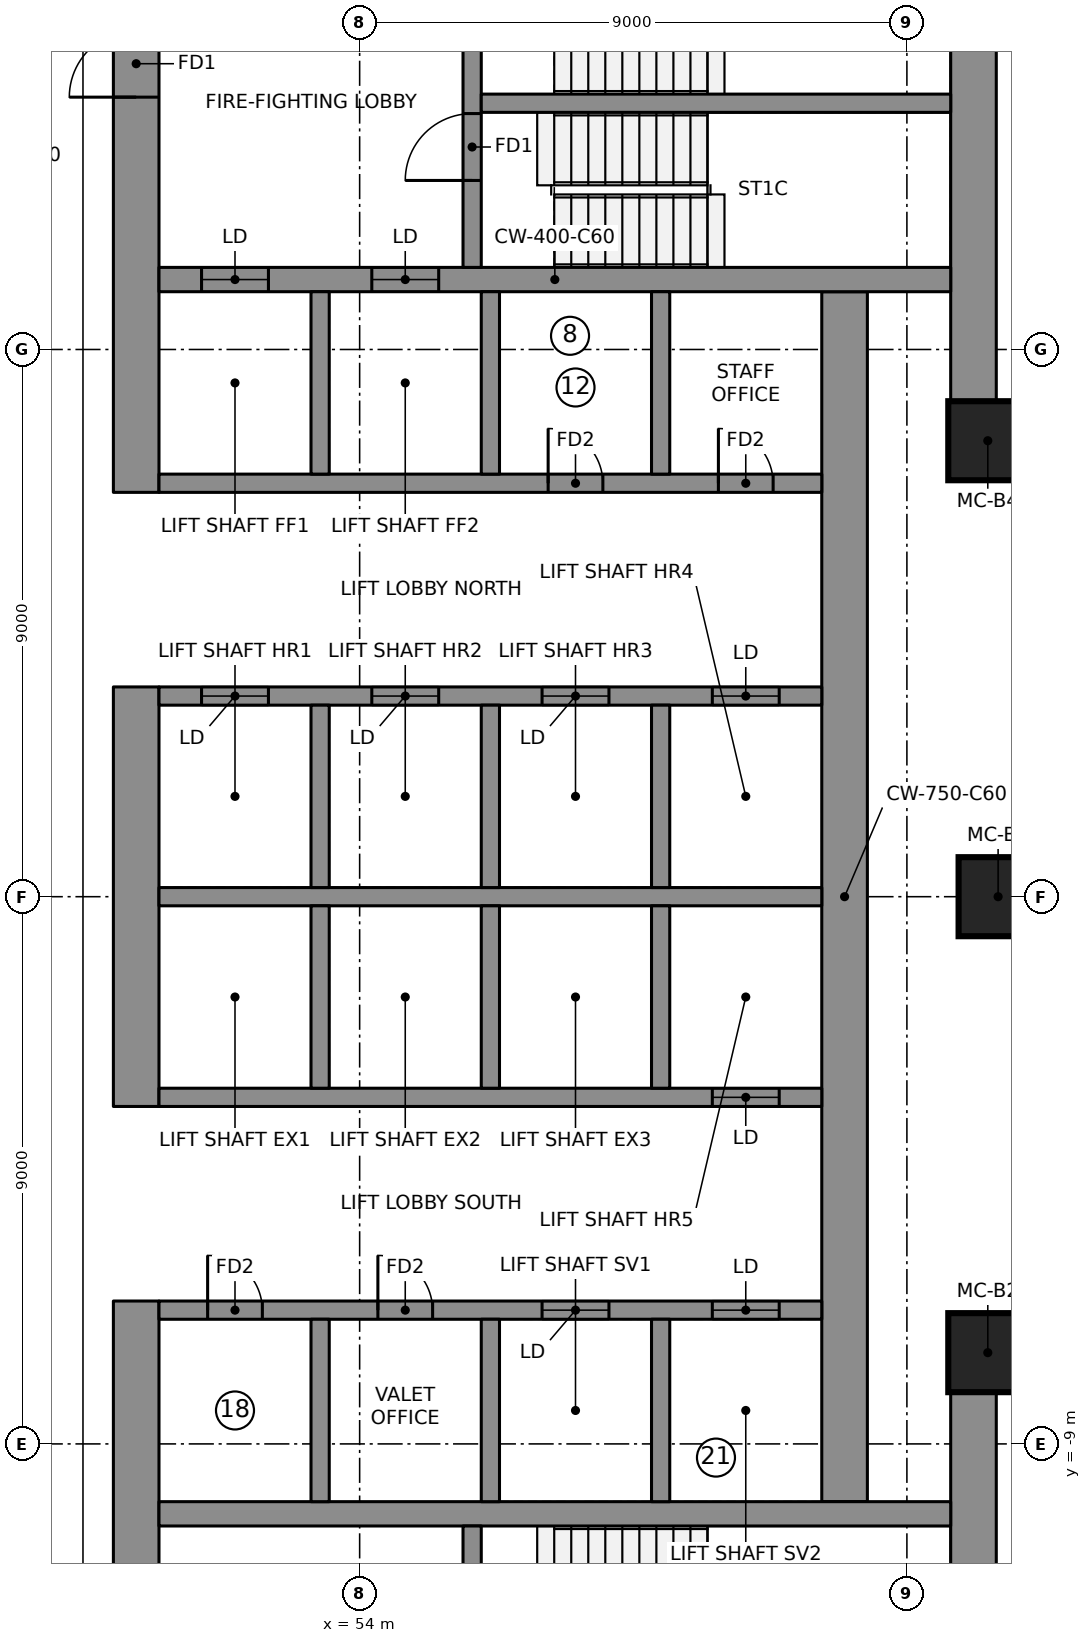
"""IFC4 building model, lengths in metres.
Left out: names, types, materials, properties, quantities, classifications, styles, units other than length and angle.
Written with IfcOpenShell. Run it as: python <this file> out.ifc"""

import sys

from ifc_helpers import new_model, si_unit, direction, frame, frame_2d, origin, origin_2d, place, context, subcontext, project, spatial, rectangle, extrude, element, fill, save


model = new_model("IFC4")
c1 = context("Model", 3, precision=1e-05, world=origin(), true_north=direction((0.0, 1.0)))
c2 = subcontext(c1, "Body", "Model", "MODEL_VIEW")
j1 = project(units=[si_unit("LENGTHUNIT", "METRE"), si_unit("PLANEANGLEUNIT", "RADIAN")], contexts=[c1])
p1 = place(None, origin())
s1 = spatial("IfcSite", under=j1, at=p1, CompositionType="ELEMENT")
p2 = place(p1, origin())
s2 = spatial("IfcBuilding", under=s1, at=p2, CompositionType="ELEMENT")
p3 = place(p2, frame((0.0, 0.0, 203.9)))
s3 = spatial("IfcBuildingStorey", under=s2, at=p3, CompositionType="ELEMENT", Elevation=203.9)
p4 = place(p3, frame((50.325, 6.65, 0.0), z_axis=(0.0, 0.0, 1.0), x_axis=(0.0, 1.0, 0.0)))
e1 = element("IfcWall", 1, at=p4, inside=s3, PredefinedType="SHEAR", context=c2, shape_type="SweptSolid", body=[
    extrude(rectangle(XDim=9.85, YDim=0.75, at=frame_2d((4.925, 0.0))), origin(), (0.0, 0.0, 1.0), 3.55),
])
p5 = place(p4, frame((6.5, 0.0, 0.0)))
e2 = element("IfcOpeningElement", 2, at=p5, cuts=e1, PredefinedType="OPENING", context=c2, shape_type="SweptSolid", body=[
    extrude(rectangle(XDim=1.1, YDim=2.1, at=frame_2d((0.55, 1.05))), frame((0.0, 0.385, 0.0), z_axis=(0.0, -1.0, 0.0), x_axis=(1.0, 0.0, 0.0)), (0.0, 0.0, 1.0), 0.77),
])
p6 = place(p3, frame((50.325, -3.45, 0.0), z_axis=(0.0, 0.0, 1.0), x_axis=(0.0, 1.0, 0.0)))
e3 = element("IfcWall", 3, at=p6, inside=s3, PredefinedType="SHEAR", context=c2, shape_type="SweptSolid", body=[
    extrude(rectangle(XDim=6.9, YDim=0.75, at=frame_2d((3.45, 0.0))), origin(), (0.0, 0.0, 1.0), 3.55),
])
p7 = place(p3, frame((50.325, -16.5, 0.0), z_axis=(0.0, 0.0, 1.0), x_axis=(0.0, 1.0, 0.0)))
e4 = element("IfcWall", 4, at=p7, inside=s3, PredefinedType="SHEAR", context=c2, shape_type="SweptSolid", body=[
    extrude(rectangle(XDim=9.85, YDim=0.75, at=frame_2d((4.925, 0.0))), origin(), (0.0, 0.0, 1.0), 3.55),
])
p8 = place(p7, frame((2.25, 0.0, 0.0)))
e5 = element("IfcOpeningElement", 5, at=p8, cuts=e4, PredefinedType="OPENING", context=c2, shape_type="SweptSolid", body=[
    extrude(rectangle(XDim=1.1, YDim=2.1, at=frame_2d((0.55, 1.05))), frame((0.0, 0.385, 0.0), z_axis=(0.0, -1.0, 0.0), x_axis=(1.0, 0.0, 0.0)), (0.0, 0.0, 1.0), 0.77),
])
for number, where, z_axis, x_axis in (
    (6, (64.095, 8.099, 0.0), (0.0, 0.0, 1.0), (0.0, 1.0, 0.0)),
    (7, (64.095, -15.75, 0.0), (0.0, 0.0, 1.0), (0.0, 1.0, 0.0)),
):
    element("IfcWall", number, at=place(p3, frame(where, z_axis=z_axis, x_axis=x_axis)), inside=s3, PredefinedType="SHEAR", context=c2, shape_type="SweptSolid", body=[
        extrude(rectangle(XDim=7.651, YDim=0.75, at=frame_2d((3.825, 0.0))), origin(), (0.0, 0.0, 1.0), 3.55),
    ])
p9 = place(p3, frame((61.975, -9.95, 0.0), z_axis=(0.0, 0.0, 1.0), x_axis=(0.0, 1.0, 0.0)))
e8 = element("IfcWall", 8, at=p9, inside=s3, PredefinedType="SHEAR", context=c2, shape_type="SweptSolid", body=[
    extrude(rectangle(XDim=19.9, YDim=0.75, at=frame_2d((9.95, 0.0))), origin(), (0.0, 0.0, 1.0), 3.55),
])
p10 = place(p3, frame((50.7, 10.15, 0.0), z_axis=(0.0, 0.0, 1.0), x_axis=(1.0, 0.0, 0.0)))
e9 = element("IfcWall", 9, at=p10, inside=s3, PredefinedType="SHEAR", context=c2, shape_type="SweptSolid", body=[
    extrude(rectangle(XDim=13.02, YDim=0.4, at=frame_2d((6.51, 0.0))), origin(), (0.0, 0.0, 1.0), 3.55),
])
p11 = place(p10, frame((0.7, 0.0, 0.0)))
e10 = element("IfcOpeningElement", 10, at=p11, cuts=e9, PredefinedType="OPENING", context=c2, shape_type="SweptSolid", body=[
    extrude(rectangle(XDim=1.1, YDim=2.1, at=frame_2d((0.55, 1.05))), frame((0.0, 0.21, 0.0), z_axis=(0.0, -1.0, 0.0), x_axis=(1.0, 0.0, 0.0)), (0.0, 0.0, 1.0), 0.42),
])
p12 = place(p10, frame((3.5, 0.0, 0.0)))
e11 = element("IfcOpeningElement", 11, at=p12, cuts=e9, PredefinedType="OPENING", context=c2, shape_type="SweptSolid", body=[
    extrude(rectangle(XDim=1.1, YDim=2.1, at=frame_2d((0.55, 1.05))), frame((0.0, 0.21, 0.0), z_axis=(0.0, -1.0, 0.0), x_axis=(1.0, 0.0, 0.0)), (0.0, 0.0, 1.0), 0.42),
])
p13 = place(p3, frame((50.7, -10.15, 0.0), z_axis=(0.0, 0.0, 1.0), x_axis=(1.0, 0.0, 0.0)))
e12 = element("IfcWall", 12, at=p13, inside=s3, PredefinedType="SHEAR", context=c2, shape_type="SweptSolid", body=[
    extrude(rectangle(XDim=13.02, YDim=0.4, at=frame_2d((6.51, 0.0))), origin(), (0.0, 0.0, 1.0), 3.55),
])
p14 = place(p3, frame((50.7, 0.0, 0.0), z_axis=(0.0, 0.0, 1.0), x_axis=(1.0, 0.0, 0.0)))
e13 = element("IfcWall", 13, at=p14, inside=s3, PredefinedType="SHEAR", context=c2, shape_type="SweptSolid", body=[
    extrude(rectangle(XDim=10.9, YDim=0.3, at=frame_2d((5.45, 0.0))), origin(), (0.0, 0.0, 1.0), 3.55),
])
p15 = place(p3, frame((50.7, 3.3, 0.0), z_axis=(0.0, 0.0, 1.0), x_axis=(1.0, 0.0, 0.0)))
e14 = element("IfcWall", 14, at=p15, inside=s3, PredefinedType="SHEAR", context=c2, shape_type="SweptSolid", body=[
    extrude(rectangle(XDim=10.9, YDim=0.3, at=frame_2d((5.45, 0.0))), origin(), (0.0, 0.0, 1.0), 3.55),
])
p16 = place(p15, frame((0.7, 0.0, 0.0)))
e15 = element("IfcOpeningElement", 15, at=p16, cuts=e14, PredefinedType="OPENING", context=c2, shape_type="SweptSolid", body=[
    extrude(rectangle(XDim=1.1, YDim=2.1, at=frame_2d((0.55, 1.05))), frame((0.0, 0.16, 0.0), z_axis=(0.0, -1.0, 0.0), x_axis=(1.0, 0.0, 0.0)), (0.0, 0.0, 1.0), 0.32),
])
p17 = place(p15, frame((3.5, 0.0, 0.0)))
e16 = element("IfcOpeningElement", 16, at=p17, cuts=e14, PredefinedType="OPENING", context=c2, shape_type="SweptSolid", body=[
    extrude(rectangle(XDim=1.1, YDim=2.1, at=frame_2d((0.55, 1.05))), frame((0.0, 0.16, 0.0), z_axis=(0.0, -1.0, 0.0), x_axis=(1.0, 0.0, 0.0)), (0.0, 0.0, 1.0), 0.32),
])
p18 = place(p15, frame((6.3, 0.0, 0.0)))
e17 = element("IfcOpeningElement", 17, at=p18, cuts=e14, PredefinedType="OPENING", context=c2, shape_type="SweptSolid", body=[
    extrude(rectangle(XDim=1.1, YDim=2.1, at=frame_2d((0.55, 1.05))), frame((0.0, 0.16, 0.0), z_axis=(0.0, -1.0, 0.0), x_axis=(1.0, 0.0, 0.0)), (0.0, 0.0, 1.0), 0.32),
])
p19 = place(p15, frame((9.1, 0.0, 0.0)))
e18 = element("IfcOpeningElement", 18, at=p19, cuts=e14, PredefinedType="OPENING", context=c2, shape_type="SweptSolid", body=[
    extrude(rectangle(XDim=1.1, YDim=2.1, at=frame_2d((0.55, 1.05))), frame((0.0, 0.16, 0.0), z_axis=(0.0, -1.0, 0.0), x_axis=(1.0, 0.0, 0.0)), (0.0, 0.0, 1.0), 0.32),
])
p20 = place(p3, frame((50.7, 6.8, 0.0), z_axis=(0.0, 0.0, 1.0), x_axis=(1.0, 0.0, 0.0)))
e19 = element("IfcWall", 19, at=p20, inside=s3, PredefinedType="SHEAR", context=c2, shape_type="SweptSolid", body=[
    extrude(rectangle(XDim=10.9, YDim=0.3, at=frame_2d((5.45, 0.0))), origin(), (0.0, 0.0, 1.0), 3.55),
])
p21 = place(p20, frame((6.4, 0.0, 0.0)))
e20 = element("IfcOpeningElement", 20, at=p21, cuts=e19, PredefinedType="OPENING", context=c2, shape_type="SweptSolid", body=[
    extrude(rectangle(XDim=0.9, YDim=2.1, at=frame_2d((0.45, 1.05))), frame((0.0, 0.16, 0.0), z_axis=(0.0, -1.0, 0.0), x_axis=(1.0, 0.0, 0.0)), (0.0, 0.0, 1.0), 0.32),
])
p22 = place(p20, frame((9.2, 0.0, 0.0)))
e21 = element("IfcOpeningElement", 21, at=p22, cuts=e19, PredefinedType="OPENING", context=c2, shape_type="SweptSolid", body=[
    extrude(rectangle(XDim=0.9, YDim=2.1, at=frame_2d((0.45, 1.05))), frame((0.0, 0.16, 0.0), z_axis=(0.0, -1.0, 0.0), x_axis=(1.0, 0.0, 0.0)), (0.0, 0.0, 1.0), 0.32),
])
for number, where, z_axis, x_axis in (
    (22, (53.35, 0.15, 0.0), (0.0, 0.0, 1.0), (0.0, 1.0, 0.0)),
    (23, (53.35, 6.95, 0.0), (0.0, 0.0, 1.0), (0.0, 1.0, 0.0)),
    (24, (56.15, 0.15, 0.0), (0.0, 0.0, 1.0), (0.0, 1.0, 0.0)),
    (25, (56.15, 6.95, 0.0), (0.0, 0.0, 1.0), (0.0, 1.0, 0.0)),
    (26, (58.95, 0.15, 0.0), (0.0, 0.0, 1.0), (0.0, 1.0, 0.0)),
    (27, (58.95, 6.95, 0.0), (0.0, 0.0, 1.0), (0.0, 1.0, 0.0)),
):
    element("IfcWall", number, at=place(p3, frame(where, z_axis=z_axis, x_axis=x_axis)), inside=s3, PredefinedType="SHEAR", context=c2, shape_type="SweptSolid", body=[
        extrude(rectangle(XDim=3.0, YDim=0.3, at=frame_2d((1.5, 0.0))), origin(), (0.0, 0.0, 1.0), 3.55),
    ])
p23 = place(p3, frame((50.7, -3.3, 0.0), z_axis=(0.0, 0.0, 1.0), x_axis=(1.0, 0.0, 0.0)))
e28 = element("IfcWall", 28, at=p23, inside=s3, PredefinedType="SHEAR", context=c2, shape_type="SweptSolid", body=[
    extrude(rectangle(XDim=10.9, YDim=0.3, at=frame_2d((5.45, 0.0))), origin(), (0.0, 0.0, 1.0), 3.55),
])
p24 = place(p23, frame((9.1, 0.0, 0.0)))
e29 = element("IfcOpeningElement", 29, at=p24, cuts=e28, PredefinedType="OPENING", context=c2, shape_type="SweptSolid", body=[
    extrude(rectangle(XDim=1.1, YDim=2.1, at=frame_2d((0.55, 1.05))), frame((0.0, 0.16, 0.0), z_axis=(0.0, -1.0, 0.0), x_axis=(1.0, 0.0, 0.0)), (0.0, 0.0, 1.0), 0.32),
])
p25 = place(p3, frame((50.7, -6.8, 0.0), z_axis=(0.0, 0.0, 1.0), x_axis=(1.0, 0.0, 0.0)))
e30 = element("IfcWall", 30, at=p25, inside=s3, PredefinedType="SHEAR", context=c2, shape_type="SweptSolid", body=[
    extrude(rectangle(XDim=10.9, YDim=0.3, at=frame_2d((5.45, 0.0))), origin(), (0.0, 0.0, 1.0), 3.55),
])
p26 = place(p25, frame((6.3, 0.0, 0.0)))
e31 = element("IfcOpeningElement", 31, at=p26, cuts=e30, PredefinedType="OPENING", context=c2, shape_type="SweptSolid", body=[
    extrude(rectangle(XDim=1.1, YDim=2.1, at=frame_2d((0.55, 1.05))), frame((0.0, 0.16, 0.0), z_axis=(0.0, -1.0, 0.0), x_axis=(1.0, 0.0, 0.0)), (0.0, 0.0, 1.0), 0.32),
])
p27 = place(p25, frame((9.1, 0.0, 0.0)))
e32 = element("IfcOpeningElement", 32, at=p27, cuts=e30, PredefinedType="OPENING", context=c2, shape_type="SweptSolid", body=[
    extrude(rectangle(XDim=1.1, YDim=2.1, at=frame_2d((0.55, 1.05))), frame((0.0, 0.16, 0.0), z_axis=(0.0, -1.0, 0.0), x_axis=(1.0, 0.0, 0.0)), (0.0, 0.0, 1.0), 0.32),
])
p28 = place(p25, frame((0.8, 0.0, 0.0)))
e33 = element("IfcOpeningElement", 33, at=p28, cuts=e30, PredefinedType="OPENING", context=c2, shape_type="SweptSolid", body=[
    extrude(rectangle(XDim=0.9, YDim=2.1, at=frame_2d((0.45, 1.05))), frame((0.0, 0.16, 0.0), z_axis=(0.0, -1.0, 0.0), x_axis=(1.0, 0.0, 0.0)), (0.0, 0.0, 1.0), 0.32),
])
p29 = place(p25, frame((3.6, 0.0, 0.0)))
e34 = element("IfcOpeningElement", 34, at=p29, cuts=e30, PredefinedType="OPENING", context=c2, shape_type="SweptSolid", body=[
    extrude(rectangle(XDim=0.9, YDim=2.1, at=frame_2d((0.45, 1.05))), frame((0.0, 0.16, 0.0), z_axis=(0.0, -1.0, 0.0), x_axis=(1.0, 0.0, 0.0)), (0.0, 0.0, 1.0), 0.32),
])
for number, where, z_axis, x_axis in (
    (35, (53.35, -3.15, 0.0), (0.0, 0.0, 1.0), (0.0, 1.0, 0.0)),
    (36, (53.35, -9.95, 0.0), (0.0, 0.0, 1.0), (0.0, 1.0, 0.0)),
    (37, (56.15, -3.15, 0.0), (0.0, 0.0, 1.0), (0.0, 1.0, 0.0)),
    (38, (56.15, -9.95, 0.0), (0.0, 0.0, 1.0), (0.0, 1.0, 0.0)),
    (39, (58.95, -3.15, 0.0), (0.0, 0.0, 1.0), (0.0, 1.0, 0.0)),
    (40, (58.95, -9.95, 0.0), (0.0, 0.0, 1.0), (0.0, 1.0, 0.0)),
):
    element("IfcWall", number, at=place(p3, frame(where, z_axis=z_axis, x_axis=x_axis)), inside=s3, PredefinedType="SHEAR", context=c2, shape_type="SweptSolid", body=[
        extrude(rectangle(XDim=3.0, YDim=0.3, at=frame_2d((1.5, 0.0))), origin(), (0.0, 0.0, 1.0), 3.55),
    ])
p30 = place(p3, frame((55.85, 10.35, 0.0), z_axis=(0.0, 0.0, 1.0), x_axis=(0.0, 1.0, 0.0)))
e41 = element("IfcWall", 41, at=p30, inside=s3, PredefinedType="SHEAR", context=c2, shape_type="SweptSolid", body=[
    extrude(rectangle(XDim=5.4, YDim=0.3, at=frame_2d((2.7, 0.0))), origin(), (0.0, 0.0, 1.0), 3.55),
])
p31 = place(p30, frame((1.43, 0.0, 0.0)))
e42 = element("IfcOpeningElement", 42, at=p31, cuts=e41, PredefinedType="OPENING", context=c2, shape_type="SweptSolid", body=[
    extrude(rectangle(XDim=1.1, YDim=2.1, at=frame_2d((0.55, 1.05))), frame((0.0, 0.16, 0.0), z_axis=(0.0, -1.0, 0.0), x_axis=(1.0, 0.0, 0.0)), (0.0, 0.0, 1.0), 0.32),
])
p32 = place(p30, frame((3.6, 0.0, 0.0)))
e43 = element("IfcOpeningElement", 43, at=p32, cuts=e41, PredefinedType="OPENING", context=c2, shape_type="SweptSolid", body=[
    extrude(rectangle(XDim=1.1, YDim=2.1, at=frame_2d((0.55, 1.05))), frame((0.0, 0.16, 0.0), z_axis=(0.0, -1.0, 0.0), x_axis=(1.0, 0.0, 0.0)), (0.0, 0.0, 1.0), 0.32),
])
p33 = place(p3, frame((55.85, -15.75, 0.0), z_axis=(0.0, 0.0, 1.0), x_axis=(0.0, 1.0, 0.0)))
e44 = element("IfcWall", 44, at=p33, inside=s3, PredefinedType="SHEAR", context=c2, shape_type="SweptSolid", body=[
    extrude(rectangle(XDim=5.4, YDim=0.3, at=frame_2d((2.7, 0.0))), origin(), (0.0, 0.0, 1.0), 3.55),
])
p34 = place(p33, frame((3.6, 0.0, 0.0)))
e45 = element("IfcOpeningElement", 45, at=p34, cuts=e44, PredefinedType="OPENING", context=c2, shape_type="SweptSolid", body=[
    extrude(rectangle(XDim=1.1, YDim=2.1, at=frame_2d((0.55, 1.05))), frame((0.0, 0.16, 0.0), z_axis=(0.0, -1.0, 0.0), x_axis=(1.0, 0.0, 0.0)), (0.0, 0.0, 1.0), 0.32),
])
p35 = place(p33, frame((0.8, 0.0, 0.0)))
e46 = element("IfcOpeningElement", 46, at=p35, cuts=e44, PredefinedType="OPENING", context=c2, shape_type="SweptSolid", body=[
    extrude(rectangle(XDim=0.9, YDim=2.1, at=frame_2d((0.45, 1.05))), frame((0.0, 0.16, 0.0), z_axis=(0.0, -1.0, 0.0), x_axis=(1.0, 0.0, 0.0)), (0.0, 0.0, 1.0), 0.32),
])
p36 = place(p3, frame((56.0, 13.05, 0.0), z_axis=(0.0, 0.0, 1.0), x_axis=(1.0, 0.0, 0.0)))
e47 = element("IfcWall", 47, at=p36, inside=s3, PredefinedType="SHEAR", context=c2, shape_type="SweptSolid", body=[
    extrude(rectangle(XDim=7.72, YDim=0.3, at=frame_2d((3.86, 0.0))), origin(), (0.0, 0.0, 1.0), 3.55),
])
for number, where, z_axis, x_axis in (
    (48, (64.33, -7.499, 0.0), (0.0, 0.0, 1.0), (1.0, 0.0, 0.0)),
    (49, (64.5, 0.0, 0.0), (0.0, 0.0, 1.0), (1.0, 0.0, 0.0)),
    (50, (64.33, 7.499, 0.0), (0.0, 0.0, 1.0), (1.0, 0.0, 0.0)),
):
    element("IfcColumn", number, at=place(p3, frame(where, z_axis=z_axis, x_axis=x_axis)), inside=s3, PredefinedType="COLUMN", context=c2, shape_type="SweptSolid", body=[
        extrude(rectangle(XDim=1.3, YDim=1.3, at=origin_2d()), origin(), (0.0, 0.0, 1.0), 3.55),
    ])
p37 = place(p11, origin())
e51 = element("IfcDoor", 51, at=p37, inside=s3, OperationType="DOUBLE_DOOR_SLIDING", PredefinedType="DOOR", context=c2, shape_type="SweptSolid", body=[
    extrude(rectangle(XDim=1.1, YDim=2.1, at=frame_2d((0.55, 1.05))), frame((0.0, 0.025, 0.0), z_axis=(0.0, -1.0, 0.0), x_axis=(1.0, 0.0, 0.0)), (0.0, 0.0, 1.0), 0.05),
])
fill(e10, e51)
p38 = place(p12, origin())
e52 = element("IfcDoor", 52, at=p38, inside=s3, OperationType="DOUBLE_DOOR_SLIDING", PredefinedType="DOOR", context=c2, shape_type="SweptSolid", body=[
    extrude(rectangle(XDim=1.1, YDim=2.1, at=frame_2d((0.55, 1.05))), frame((0.0, 0.025, 0.0), z_axis=(0.0, -1.0, 0.0), x_axis=(1.0, 0.0, 0.0)), (0.0, 0.0, 1.0), 0.05),
])
fill(e11, e52)
p39 = place(p16, origin())
e53 = element("IfcDoor", 53, at=p39, inside=s3, OperationType="DOUBLE_DOOR_SLIDING", PredefinedType="DOOR", context=c2, shape_type="SweptSolid", body=[
    extrude(rectangle(XDim=1.1, YDim=2.1, at=frame_2d((0.55, 1.05))), frame((0.0, 0.025, 0.0), z_axis=(0.0, -1.0, 0.0), x_axis=(1.0, 0.0, 0.0)), (0.0, 0.0, 1.0), 0.05),
])
fill(e15, e53)
p40 = place(p17, origin())
e54 = element("IfcDoor", 54, at=p40, inside=s3, OperationType="DOUBLE_DOOR_SLIDING", PredefinedType="DOOR", context=c2, shape_type="SweptSolid", body=[
    extrude(rectangle(XDim=1.1, YDim=2.1, at=frame_2d((0.55, 1.05))), frame((0.0, 0.025, 0.0), z_axis=(0.0, -1.0, 0.0), x_axis=(1.0, 0.0, 0.0)), (0.0, 0.0, 1.0), 0.05),
])
fill(e16, e54)
p41 = place(p18, origin())
e55 = element("IfcDoor", 55, at=p41, inside=s3, OperationType="DOUBLE_DOOR_SLIDING", PredefinedType="DOOR", context=c2, shape_type="SweptSolid", body=[
    extrude(rectangle(XDim=1.1, YDim=2.1, at=frame_2d((0.55, 1.05))), frame((0.0, 0.025, 0.0), z_axis=(0.0, -1.0, 0.0), x_axis=(1.0, 0.0, 0.0)), (0.0, 0.0, 1.0), 0.05),
])
fill(e17, e55)
p42 = place(p19, origin())
e56 = element("IfcDoor", 56, at=p42, inside=s3, OperationType="DOUBLE_DOOR_SLIDING", PredefinedType="DOOR", context=c2, shape_type="SweptSolid", body=[
    extrude(rectangle(XDim=1.1, YDim=2.1, at=frame_2d((0.55, 1.05))), frame((0.0, 0.025, 0.0), z_axis=(0.0, -1.0, 0.0), x_axis=(1.0, 0.0, 0.0)), (0.0, 0.0, 1.0), 0.05),
])
fill(e18, e56)
p43 = place(p24, origin())
e57 = element("IfcDoor", 57, at=p43, inside=s3, OperationType="DOUBLE_DOOR_SLIDING", PredefinedType="DOOR", context=c2, shape_type="SweptSolid", body=[
    extrude(rectangle(XDim=1.1, YDim=2.1, at=frame_2d((0.55, 1.05))), frame((0.0, 0.025, 0.0), z_axis=(0.0, -1.0, 0.0), x_axis=(1.0, 0.0, 0.0)), (0.0, 0.0, 1.0), 0.05),
])
fill(e29, e57)
p44 = place(p26, origin())
e58 = element("IfcDoor", 58, at=p44, inside=s3, OperationType="DOUBLE_DOOR_SLIDING", PredefinedType="DOOR", context=c2, shape_type="SweptSolid", body=[
    extrude(rectangle(XDim=1.1, YDim=2.1, at=frame_2d((0.55, 1.05))), frame((0.0, 0.025, 0.0), z_axis=(0.0, -1.0, 0.0), x_axis=(1.0, 0.0, 0.0)), (0.0, 0.0, 1.0), 0.05),
])
fill(e31, e58)
p45 = place(p27, origin())
e59 = element("IfcDoor", 59, at=p45, inside=s3, OperationType="DOUBLE_DOOR_SLIDING", PredefinedType="DOOR", context=c2, shape_type="SweptSolid", body=[
    extrude(rectangle(XDim=1.1, YDim=2.1, at=frame_2d((0.55, 1.05))), frame((0.0, 0.025, 0.0), z_axis=(0.0, -1.0, 0.0), x_axis=(1.0, 0.0, 0.0)), (0.0, 0.0, 1.0), 0.05),
])
fill(e32, e59)
p46 = place(p31, origin())
e60 = element("IfcDoor", 60, at=p46, inside=s3, OperationType="SINGLE_SWING_RIGHT", PredefinedType="DOOR", context=c2, shape_type="SweptSolid", body=[
    extrude(rectangle(XDim=1.1, YDim=2.1, at=frame_2d((0.55, 1.05))), frame((0.0, 0.025, 0.0), z_axis=(0.0, -1.0, 0.0), x_axis=(1.0, 0.0, 0.0)), (0.0, 0.0, 1.0), 0.05),
])
fill(e42, e60)
p47 = place(p5, origin())
e61 = element("IfcDoor", 61, at=p47, inside=s3, OperationType="SINGLE_SWING_RIGHT", PredefinedType="DOOR", context=c2, shape_type="SweptSolid", body=[
    extrude(rectangle(XDim=1.1, YDim=2.1, at=frame_2d((0.55, 1.05))), frame((0.0, 0.025, 0.0), z_axis=(0.0, -1.0, 0.0), x_axis=(1.0, 0.0, 0.0)), (0.0, 0.0, 1.0), 0.05),
])
fill(e2, e61)
p48 = place(p21, origin())
e62 = element("IfcDoor", 62, at=p48, inside=s3, OperationType="SINGLE_SWING_LEFT", PredefinedType="DOOR", context=c2, shape_type="SweptSolid", body=[
    extrude(rectangle(XDim=0.9, YDim=2.1, at=frame_2d((0.45, 1.05))), frame((0.0, 0.025, 0.0), z_axis=(0.0, -1.0, 0.0), x_axis=(1.0, 0.0, 0.0)), (0.0, 0.0, 1.0), 0.05),
])
fill(e20, e62)
p49 = place(p22, origin())
e63 = element("IfcDoor", 63, at=p49, inside=s3, OperationType="SINGLE_SWING_LEFT", PredefinedType="DOOR", context=c2, shape_type="SweptSolid", body=[
    extrude(rectangle(XDim=0.9, YDim=2.1, at=frame_2d((0.45, 1.05))), frame((0.0, 0.025, 0.0), z_axis=(0.0, -1.0, 0.0), x_axis=(1.0, 0.0, 0.0)), (0.0, 0.0, 1.0), 0.05),
])
fill(e21, e63)
p50 = place(p28, origin())
e64 = element("IfcDoor", 64, at=p50, inside=s3, OperationType="SINGLE_SWING_LEFT", PredefinedType="DOOR", context=c2, shape_type="SweptSolid", body=[
    extrude(rectangle(XDim=0.9, YDim=2.1, at=frame_2d((0.45, 1.05))), frame((0.0, 0.025, 0.0), z_axis=(0.0, -1.0, 0.0), x_axis=(1.0, 0.0, 0.0)), (0.0, 0.0, 1.0), 0.05),
])
fill(e33, e64)
p51 = place(p29, origin())
e65 = element("IfcDoor", 65, at=p51, inside=s3, OperationType="SINGLE_SWING_LEFT", PredefinedType="DOOR", context=c2, shape_type="SweptSolid", body=[
    extrude(rectangle(XDim=0.9, YDim=2.1, at=frame_2d((0.45, 1.05))), frame((0.0, 0.025, 0.0), z_axis=(0.0, -1.0, 0.0), x_axis=(1.0, 0.0, 0.0)), (0.0, 0.0, 1.0), 0.05),
])
fill(e34, e65)
save(model, sys.argv[1])
